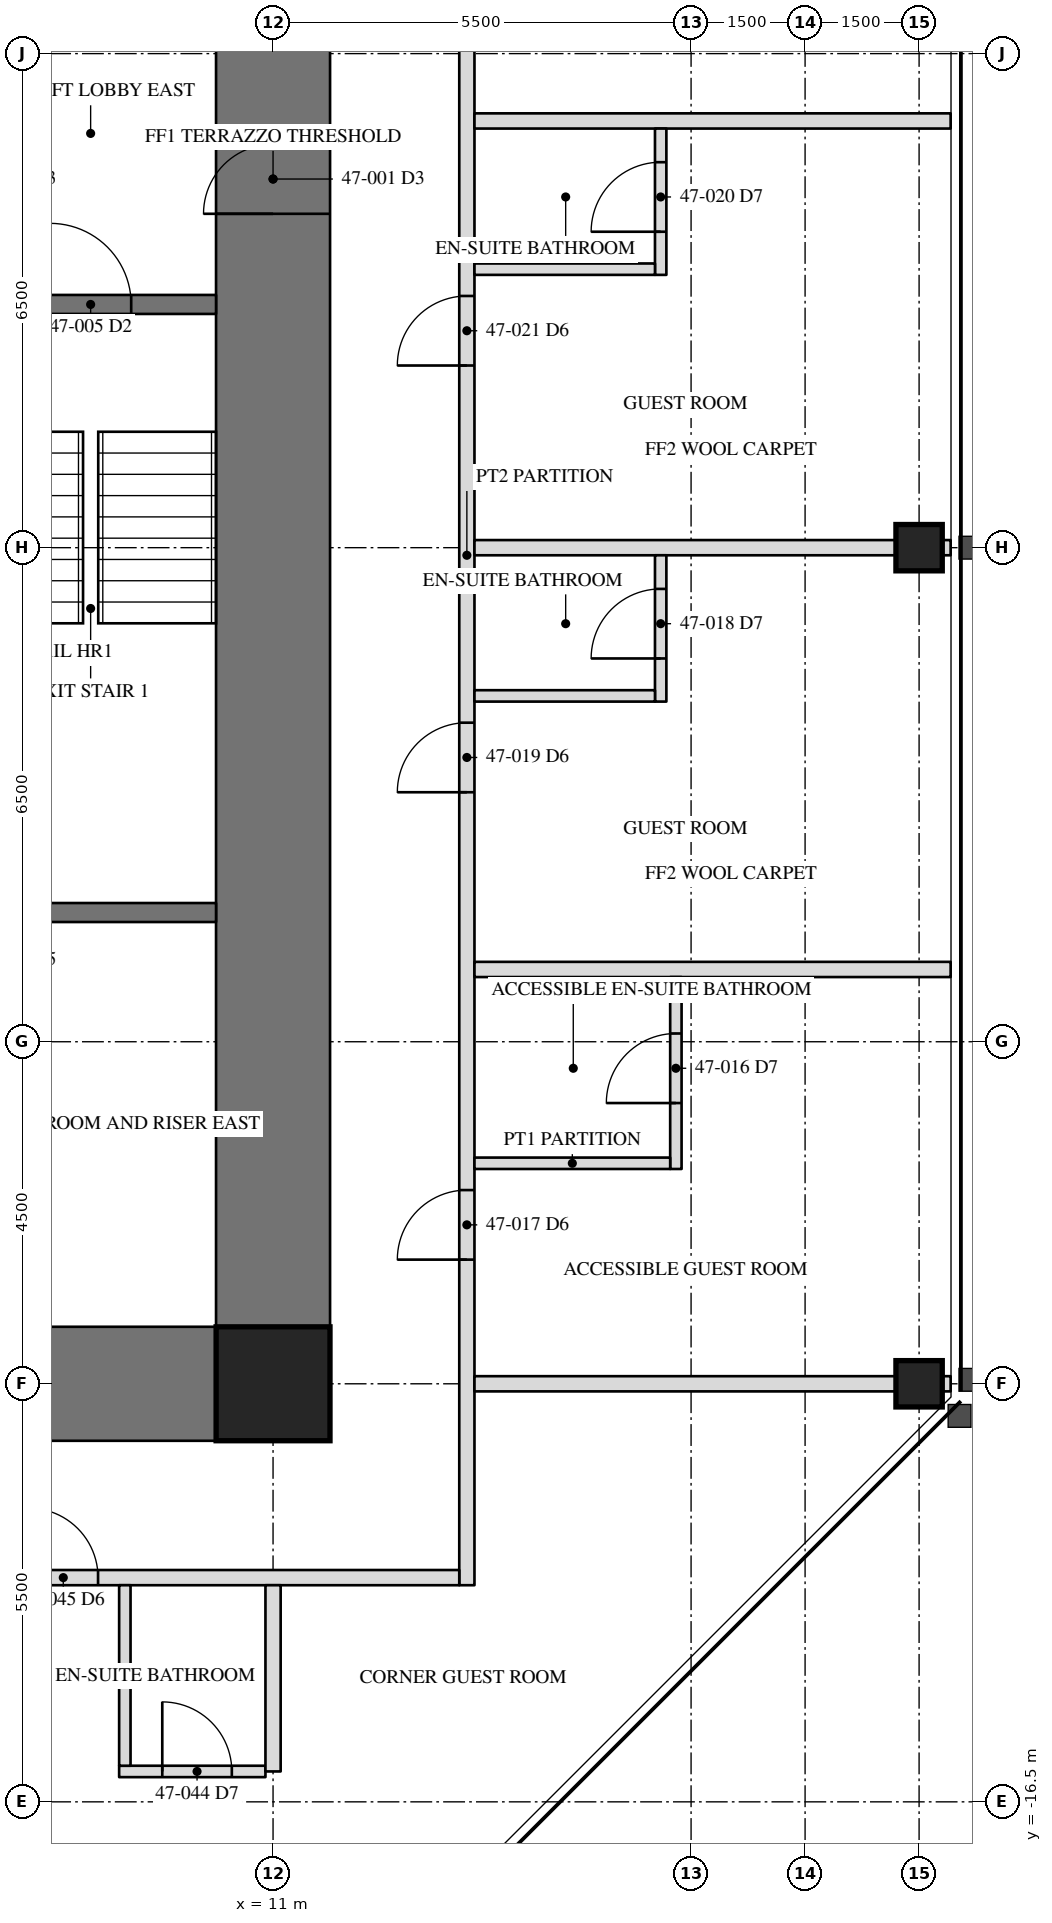
"""IFC4 building model, lengths in metres.
Left out: names, types, materials, properties, quantities, classifications, styles, units other than length and angle.
Written with IfcOpenShell. Run it as: python <this file> out.ifc"""

import sys

from ifc_helpers import new_model, si_unit, direction, frame, frame_2d, origin, origin_2d, place, context, subcontext, project, spatial, rectangle, hollow_rectangle, extrude, element, fill, save


model = new_model("IFC4")
c1 = context("Model", 3, precision=1e-05, world=origin(), true_north=direction((0.0, 1.0)))
c2 = subcontext(c1, "Body", "Model", "MODEL_VIEW")
j1 = project(units=[si_unit("LENGTHUNIT", "METRE"), si_unit("PLANEANGLEUNIT", "RADIAN")], contexts=[c1])
p1 = place(None, origin())
s1 = spatial("IfcSite", under=j1, at=p1, CompositionType="ELEMENT")
p2 = place(p1, origin())
s2 = spatial("IfcBuilding", under=s1, at=p2, CompositionType="ELEMENT")
p3 = place(p2, frame((0.0, 0.0, 201.2)))
s3 = spatial("IfcBuildingStorey", under=s2, at=p3, CompositionType="ELEMENT", Elevation=201.2)
for number, where, z_axis, x_axis in (
    (1, (19.5, -11.0, 0.0), (0.0, 0.0, 1.0), (0.0, 1.0, 0.0)),
    (2, (19.5, 0.0, 0.0), (0.0, 0.0, 1.0), (0.0, 1.0, 0.0)),
):
    element("IfcColumn", number, at=place(p3, frame(where, z_axis=z_axis, x_axis=x_axis)), inside=s3, PredefinedType="COLUMN", context=c2, shape_type="SweptSolid", body=[
        extrude(hollow_rectangle(XDim=0.61, YDim=0.61, WallThickness=0.076, at=origin_2d()), origin(), (0.0, 0.0, 1.0), 3.5),
    ])
p4 = place(p3, frame((11.0, -11.0, 0.0), z_axis=(0.0, 0.0, 1.0), x_axis=(0.0, 1.0, 0.0)))
e3 = element("IfcWall", 3, at=p4, inside=s3, PredefinedType="SHEAR", context=c2, shape_type="SweptSolid", body=[
    extrude(rectangle(XDim=22.0, YDim=1.5, at=frame_2d((11.0, 0.0))), origin(), (0.0, 0.0, 1.0), 3.5),
])
p5 = place(p4, frame((15.393, 0.0, 0.0)))
e4 = element("IfcOpeningElement", 4, at=p5, cuts=e3, PredefinedType="OPENING", context=c2, shape_type="SweptSolid", body=[
    extrude(rectangle(XDim=0.915, YDim=2.134, at=frame_2d((0.458, 1.067))), frame((0.0, 0.76, 0.0), z_axis=(0.0, -1.0, 0.0), x_axis=(1.0, 0.0, 0.0)), (0.0, 0.0, 1.0), 1.52),
])
p6 = place(p3, frame((6.5, -11.0, 0.0), z_axis=(0.0, 0.0, 1.0), x_axis=(1.0, 0.0, 0.0)))
e5 = element("IfcWall", 5, at=p6, inside=s3, PredefinedType="SHEAR", context=c2, shape_type="SweptSolid", body=[
    extrude(rectangle(XDim=4.5, YDim=1.5, at=frame_2d((2.25, 0.0))), origin(), (0.0, 0.0, 1.0), 3.5),
])
p7 = place(p3, frame((11.0, -11.0, 0.0), z_axis=(0.0, 0.0, 1.0), x_axis=(1.0, 0.0, 0.0)))
e6 = element("IfcColumn", 6, at=p7, inside=s3, PredefinedType="COLUMN", context=c2, shape_type="SweptSolid", body=[
    extrude(hollow_rectangle(XDim=1.499, YDim=1.499, WallThickness=0.102, at=origin_2d()), origin(), (0.0, 0.0, 1.0), 3.5),
])
p8 = place(p3, frame((6.95, -4.8, 0.0), z_axis=(0.0, 0.0, 1.0), x_axis=(1.0, 0.0, 0.0)))
e7 = element("IfcWall", 7, at=p8, inside=s3, PredefinedType="SOLIDWALL", context=c2, shape_type="SweptSolid", body=[
    extrude(rectangle(XDim=3.3, YDim=0.25, at=frame_2d((1.65, 0.0))), origin(), (0.0, 0.0, 1.0), 3.31),
])
p9 = place(p3, frame((6.95, 3.2, 0.0), z_axis=(0.0, 0.0, 1.0), x_axis=(1.0, 0.0, 0.0)))
e8 = element("IfcWall", 8, at=p9, inside=s3, PredefinedType="SOLIDWALL", context=c2, shape_type="SweptSolid", body=[
    extrude(rectangle(XDim=3.3, YDim=0.25, at=frame_2d((1.65, 0.0))), origin(), (0.0, 0.0, 1.0), 3.31),
])
p10 = place(p9, frame((1.116, 0.0, 0.0)))
e9 = element("IfcOpeningElement", 9, at=p10, cuts=e8, PredefinedType="OPENING", context=c2, shape_type="SweptSolid", body=[
    extrude(rectangle(XDim=1.067, YDim=2.134, at=frame_2d((0.533, 1.067))), frame((0.0, 0.135, 0.0), z_axis=(0.0, -1.0, 0.0), x_axis=(1.0, 0.0, 0.0)), (0.0, 0.0, 1.0), 0.27),
])
p11 = place(p3, frame((13.55, -13.65, 0.0), z_axis=(0.0, 0.0, 1.0), x_axis=(0.0, 1.0, 0.0)))
e10 = element("IfcWall", 10, at=p11, inside=s3, PredefinedType="PARTITIONING", context=c2, shape_type="SweptSolid", body=[
    extrude(rectangle(XDim=27.1, YDim=0.2, at=frame_2d((13.55, 0.0))), origin(), (0.0, 0.0, 1.0), 3.31),
])
p12 = place(p11, frame((4.283, 0.0, 0.0)))
e11 = element("IfcOpeningElement", 11, at=p12, cuts=e10, PredefinedType="OPENING", context=c2, shape_type="SweptSolid", body=[
    extrude(rectangle(XDim=0.915, YDim=2.134, at=frame_2d((0.458, 1.067))), frame((0.0, 0.11, 0.0), z_axis=(0.0, -1.0, 0.0), x_axis=(1.0, 0.0, 0.0)), (0.0, 0.0, 1.0), 0.22),
])
p13 = place(p11, frame((10.433, 0.0, 0.0)))
e12 = element("IfcOpeningElement", 12, at=p13, cuts=e10, PredefinedType="OPENING", context=c2, shape_type="SweptSolid", body=[
    extrude(rectangle(XDim=0.915, YDim=2.134, at=frame_2d((0.458, 1.067))), frame((0.0, 0.11, 0.0), z_axis=(0.0, -1.0, 0.0), x_axis=(1.0, 0.0, 0.0)), (0.0, 0.0, 1.0), 0.22),
])
p14 = place(p11, frame((16.046, 0.0, 0.0)))
e13 = element("IfcOpeningElement", 13, at=p14, cuts=e10, PredefinedType="OPENING", context=c2, shape_type="SweptSolid", body=[
    extrude(rectangle(XDim=0.915, YDim=2.134, at=frame_2d((0.458, 1.067))), frame((0.0, 0.11, 0.0), z_axis=(0.0, -1.0, 0.0), x_axis=(1.0, 0.0, 0.0)), (0.0, 0.0, 1.0), 0.22),
])
p15 = place(p11, frame((21.433, 0.0, 0.0)))
e14 = element("IfcOpeningElement", 14, at=p15, cuts=e10, PredefinedType="OPENING", context=c2, shape_type="SweptSolid", body=[
    extrude(rectangle(XDim=0.915, YDim=2.134, at=frame_2d((0.458, 1.067))), frame((0.0, 0.11, 0.0), z_axis=(0.0, -1.0, 0.0), x_axis=(1.0, 0.0, 0.0)), (0.0, 0.0, 1.0), 0.22),
])
p16 = place(p3, frame((-13.65, -13.55, 0.0), z_axis=(0.0, 0.0, 1.0), x_axis=(1.0, 0.0, 0.0)))
e15 = element("IfcWall", 15, at=p16, inside=s3, PredefinedType="PARTITIONING", context=c2, shape_type="SweptSolid", body=[
    extrude(rectangle(XDim=27.1, YDim=0.2, at=frame_2d((13.55, 0.0))), origin(), (0.0, 0.0, 1.0), 3.31),
])
p17 = place(p16, frame((4.884, 0.0, 0.0)))
e16 = element("IfcOpeningElement", 16, at=p17, cuts=e15, PredefinedType="OPENING", context=c2, shape_type="SweptSolid", body=[
    extrude(rectangle(XDim=0.915, YDim=2.134, at=frame_2d((0.458, 1.067))), frame((0.0, 0.11, 0.0), z_axis=(0.0, -1.0, 0.0), x_axis=(1.0, 0.0, 0.0)), (0.0, 0.0, 1.0), 0.22),
])
p18 = place(p16, frame((10.433, 0.0, 0.0)))
e17 = element("IfcOpeningElement", 17, at=p18, cuts=e15, PredefinedType="OPENING", context=c2, shape_type="SweptSolid", body=[
    extrude(rectangle(XDim=0.915, YDim=2.134, at=frame_2d((0.458, 1.067))), frame((0.0, 0.11, 0.0), z_axis=(0.0, -1.0, 0.0), x_axis=(1.0, 0.0, 0.0)), (0.0, 0.0, 1.0), 0.22),
])
p19 = place(p16, frame((16.046, 0.0, 0.0)))
e18 = element("IfcOpeningElement", 18, at=p19, cuts=e15, PredefinedType="OPENING", context=c2, shape_type="SweptSolid", body=[
    extrude(rectangle(XDim=0.915, YDim=2.134, at=frame_2d((0.458, 1.067))), frame((0.0, 0.11, 0.0), z_axis=(0.0, -1.0, 0.0), x_axis=(1.0, 0.0, 0.0)), (0.0, 0.0, 1.0), 0.22),
])
p20 = place(p16, frame((21.433, 0.0, 0.0)))
e19 = element("IfcOpeningElement", 19, at=p20, cuts=e15, PredefinedType="OPENING", context=c2, shape_type="SweptSolid", body=[
    extrude(rectangle(XDim=0.915, YDim=2.134, at=frame_2d((0.458, 1.067))), frame((0.0, 0.11, 0.0), z_axis=(0.0, -1.0, 0.0), x_axis=(1.0, 0.0, 0.0)), (0.0, 0.0, 1.0), 0.22),
])
p21 = place(p3, frame((13.65, -11.0, 0.0), z_axis=(0.0, 0.0, 1.0), x_axis=(1.0, 0.0, 0.0)))
e20 = element("IfcWall", 20, at=p21, inside=s3, PredefinedType="PARTITIONING", context=c2, shape_type="SweptSolid", body=[
    extrude(rectangle(XDim=6.265, YDim=0.2, at=frame_2d((3.133, 0.0))), origin(), (0.0, 0.0, 1.0), 2.802),
])
p22 = place(p3, frame((13.65, -5.549, 0.0), z_axis=(0.0, 0.0, 1.0), x_axis=(1.0, 0.0, 0.0)))
e21 = element("IfcWall", 21, at=p22, inside=s3, PredefinedType="PARTITIONING", context=c2, shape_type="SweptSolid", body=[
    extrude(rectangle(XDim=6.265, YDim=0.2, at=frame_2d((3.133, 0.0))), origin(), (0.0, 0.0, 1.0), 3.31),
])
p23 = place(p3, frame((13.65, 0.0, 0.0), z_axis=(0.0, 0.0, 1.0), x_axis=(1.0, 0.0, 0.0)))
e22 = element("IfcWall", 22, at=p23, inside=s3, PredefinedType="PARTITIONING", context=c2, shape_type="SweptSolid", body=[
    extrude(rectangle(XDim=6.265, YDim=0.2, at=frame_2d((3.133, 0.0))), origin(), (0.0, 0.0, 1.0), 2.802),
])
p24 = place(p3, frame((13.65, 5.614, 0.0), z_axis=(0.0, 0.0, 1.0), x_axis=(1.0, 0.0, 0.0)))
e23 = element("IfcWall", 23, at=p24, inside=s3, PredefinedType="PARTITIONING", context=c2, shape_type="SweptSolid", body=[
    extrude(rectangle(XDim=6.265, YDim=0.2, at=frame_2d((3.133, 0.0))), origin(), (0.0, 0.0, 1.0), 3.31),
])
p25 = place(p3, frame((16.3, -8.174, 0.0), z_axis=(0.0, 0.0, 1.0), x_axis=(0.0, 1.0, 0.0)))
e24 = element("IfcWall", 24, at=p25, inside=s3, PredefinedType="PARTITIONING", context=c2, shape_type="SweptSolid", body=[
    extrude(rectangle(XDim=2.525, YDim=0.15, at=frame_2d((1.263, 0.0))), origin(), (0.0, 0.0, 1.0), 3.31),
])
p26 = place(p25, frame((0.867, 0.0, 0.0)))
e25 = element("IfcOpeningElement", 25, at=p26, cuts=e24, PredefinedType="OPENING", context=c2, shape_type="SweptSolid", body=[
    extrude(rectangle(XDim=0.915, YDim=2.032, at=frame_2d((0.458, 1.016))), frame((0.0, 0.085, 0.0), z_axis=(0.0, -1.0, 0.0), x_axis=(1.0, 0.0, 0.0)), (0.0, 0.0, 1.0), 0.17),
])
p27 = place(p3, frame((13.65, -8.099, 0.0), z_axis=(0.0, 0.0, 1.0), x_axis=(1.0, 0.0, 0.0)))
e26 = element("IfcWall", 26, at=p27, inside=s3, PredefinedType="PARTITIONING", context=c2, shape_type="SweptSolid", body=[
    extrude(rectangle(XDim=2.575, YDim=0.15, at=frame_2d((1.288, 0.0))), origin(), (0.0, 0.0, 1.0), 3.31),
])
p28 = place(p3, frame((16.1, -2.025, 0.0), z_axis=(0.0, 0.0, 1.0), x_axis=(0.0, 1.0, 0.0)))
e27 = element("IfcWall", 27, at=p28, inside=s3, PredefinedType="PARTITIONING", context=c2, shape_type="SweptSolid", body=[
    extrude(rectangle(XDim=1.925, YDim=0.15, at=frame_2d((0.962, 0.0))), origin(), (0.0, 0.0, 1.0), 3.31),
])
p29 = place(p28, frame((0.567, 0.0, 0.0)))
e28 = element("IfcOpeningElement", 28, at=p29, cuts=e27, PredefinedType="OPENING", context=c2, shape_type="SweptSolid", body=[
    extrude(rectangle(XDim=0.915, YDim=2.032, at=frame_2d((0.458, 1.016))), frame((0.0, 0.085, 0.0), z_axis=(0.0, -1.0, 0.0), x_axis=(1.0, 0.0, 0.0)), (0.0, 0.0, 1.0), 0.17),
])
p30 = place(p3, frame((13.65, -1.95, 0.0), z_axis=(0.0, 0.0, 1.0), x_axis=(1.0, 0.0, 0.0)))
e29 = element("IfcWall", 29, at=p30, inside=s3, PredefinedType="PARTITIONING", context=c2, shape_type="SweptSolid", body=[
    extrude(rectangle(XDim=2.375, YDim=0.15, at=frame_2d((1.188, 0.0))), origin(), (0.0, 0.0, 1.0), 3.31),
])
p31 = place(p3, frame((16.1, 3.589, 0.0), z_axis=(0.0, 0.0, 1.0), x_axis=(0.0, 1.0, 0.0)))
e30 = element("IfcWall", 30, at=p31, inside=s3, PredefinedType="PARTITIONING", context=c2, shape_type="SweptSolid", body=[
    extrude(rectangle(XDim=1.925, YDim=0.15, at=frame_2d((0.962, 0.0))), origin(), (0.0, 0.0, 1.0), 3.31),
])
p32 = place(p31, frame((0.567, 0.0, 0.0)))
e31 = element("IfcOpeningElement", 31, at=p32, cuts=e30, PredefinedType="OPENING", context=c2, shape_type="SweptSolid", body=[
    extrude(rectangle(XDim=0.915, YDim=2.032, at=frame_2d((0.458, 1.016))), frame((0.0, 0.085, 0.0), z_axis=(0.0, -1.0, 0.0), x_axis=(1.0, 0.0, 0.0)), (0.0, 0.0, 1.0), 0.17),
])
p33 = place(p3, frame((13.65, 3.664, 0.0), z_axis=(0.0, 0.0, 1.0), x_axis=(1.0, 0.0, 0.0)))
e32 = element("IfcWall", 32, at=p33, inside=s3, PredefinedType="PARTITIONING", context=c2, shape_type="SweptSolid", body=[
    extrude(rectangle(XDim=2.375, YDim=0.15, at=frame_2d((1.188, 0.0))), origin(), (0.0, 0.0, 1.0), 2.703),
])
p34 = place(p3, frame((8.975, -16.1, 0.0), z_axis=(0.0, 0.0, 1.0), x_axis=(1.0, 0.0, 0.0)))
e33 = element("IfcWall", 33, at=p34, inside=s3, PredefinedType="PARTITIONING", context=c2, shape_type="SweptSolid", body=[
    extrude(rectangle(XDim=1.925, YDim=0.15, at=frame_2d((0.962, 0.0))), origin(), (0.0, 0.0, 1.0), 3.31),
])
p35 = place(p34, frame((0.567, 0.0, 0.0)))
e34 = element("IfcOpeningElement", 34, at=p35, cuts=e33, PredefinedType="OPENING", context=c2, shape_type="SweptSolid", body=[
    extrude(rectangle(XDim=0.915, YDim=2.032, at=frame_2d((0.458, 1.016))), frame((0.0, 0.085, 0.0), z_axis=(0.0, -1.0, 0.0), x_axis=(1.0, 0.0, 0.0)), (0.0, 0.0, 1.0), 0.17),
])
p36 = place(p3, frame((9.05, -13.65, 0.0), z_axis=(0.0, 0.0, 1.0), x_axis=(0.0, -1.0, 0.0)))
e35 = element("IfcWall", 35, at=p36, inside=s3, PredefinedType="PARTITIONING", context=c2, shape_type="SweptSolid", body=[
    extrude(rectangle(XDim=2.375, YDim=0.15, at=frame_2d((1.188, 0.0))), origin(), (0.0, 0.0, 1.0), 3.31),
])
p37 = place(p3, frame((11.0, -13.65, 0.0), z_axis=(0.0, 0.0, 1.0), x_axis=(0.0, -1.0, 0.0)))
e36 = element("IfcWall", 36, at=p37, inside=s3, PredefinedType="PARTITIONING", context=c2, shape_type="SweptSolid", body=[
    extrude(rectangle(XDim=2.45, YDim=0.2, at=frame_2d((1.225, 0.0))), origin(), (0.0, 0.0, 1.0), 2.802),
])
p38 = place(p5, origin())
e37 = element("IfcDoor", 37, at=p38, inside=s3, OperationType="SINGLE_SWING_RIGHT", PredefinedType="DOOR", context=c2, shape_type="SweptSolid", body=[
    extrude(rectangle(XDim=0.915, YDim=2.134, at=frame_2d((0.458, 1.067))), frame((0.0, -0.675, 0.0), z_axis=(0.0, -1.0, 0.0), x_axis=(1.0, 0.0, 0.0)), (0.0, 0.0, 1.0), 0.05),
])
fill(e4, e37)
p39 = place(p10, origin())
e38 = element("IfcDoor", 38, at=p39, inside=s3, OperationType="SINGLE_SWING_LEFT", PredefinedType="DOOR", context=c2, shape_type="SweptSolid", body=[
    extrude(rectangle(XDim=1.067, YDim=2.134, at=frame_2d((0.533, 1.067))), frame((0.0, 0.025, 0.0), z_axis=(0.0, -1.0, 0.0), x_axis=(1.0, 0.0, 0.0)), (0.0, 0.0, 1.0), 0.05),
])
fill(e9, e38)
p40 = place(p26, origin())
e39 = element("IfcDoor", 39, at=p40, inside=s3, OperationType="SINGLE_SWING_LEFT", PredefinedType="DOOR", context=c2, shape_type="SweptSolid", body=[
    extrude(rectangle(XDim=0.915, YDim=2.032, at=frame_2d((0.458, 1.016))), frame((0.0, 0.025, 0.0), z_axis=(0.0, -1.0, 0.0), x_axis=(1.0, 0.0, 0.0)), (0.0, 0.0, 1.0), 0.05),
])
fill(e25, e39)
p41 = place(p12, origin())
e40 = element("IfcDoor", 40, at=p41, inside=s3, OperationType="SINGLE_SWING_LEFT", PredefinedType="DOOR", context=c2, shape_type="SweptSolid", body=[
    extrude(rectangle(XDim=0.915, YDim=2.134, at=frame_2d((0.458, 1.067))), frame((0.0, 0.025, 0.0), z_axis=(0.0, -1.0, 0.0), x_axis=(1.0, 0.0, 0.0)), (0.0, 0.0, 1.0), 0.05),
])
fill(e11, e40)
p42 = place(p29, origin())
e41 = element("IfcDoor", 41, at=p42, inside=s3, OperationType="SINGLE_SWING_LEFT", PredefinedType="DOOR", context=c2, shape_type="SweptSolid", body=[
    extrude(rectangle(XDim=0.915, YDim=2.032, at=frame_2d((0.458, 1.016))), frame((0.0, 0.025, 0.0), z_axis=(0.0, -1.0, 0.0), x_axis=(1.0, 0.0, 0.0)), (0.0, 0.0, 1.0), 0.05),
])
fill(e28, e41)
p43 = place(p13, origin())
e42 = element("IfcDoor", 42, at=p43, inside=s3, OperationType="SINGLE_SWING_LEFT", PredefinedType="DOOR", context=c2, shape_type="SweptSolid", body=[
    extrude(rectangle(XDim=0.915, YDim=2.134, at=frame_2d((0.458, 1.067))), frame((0.0, 0.025, 0.0), z_axis=(0.0, -1.0, 0.0), x_axis=(1.0, 0.0, 0.0)), (0.0, 0.0, 1.0), 0.05),
])
fill(e12, e42)
p44 = place(p32, origin())
e43 = element("IfcDoor", 43, at=p44, inside=s3, OperationType="SINGLE_SWING_LEFT", PredefinedType="DOOR", context=c2, shape_type="SweptSolid", body=[
    extrude(rectangle(XDim=0.915, YDim=2.032, at=frame_2d((0.458, 1.016))), frame((0.0, 0.025, 0.0), z_axis=(0.0, -1.0, 0.0), x_axis=(1.0, 0.0, 0.0)), (0.0, 0.0, 1.0), 0.05),
])
fill(e31, e43)
p45 = place(p14, origin())
e44 = element("IfcDoor", 44, at=p45, inside=s3, OperationType="SINGLE_SWING_LEFT", PredefinedType="DOOR", context=c2, shape_type="SweptSolid", body=[
    extrude(rectangle(XDim=0.915, YDim=2.134, at=frame_2d((0.458, 1.067))), frame((0.0, 0.025, 0.0), z_axis=(0.0, -1.0, 0.0), x_axis=(1.0, 0.0, 0.0)), (0.0, 0.0, 1.0), 0.05),
])
fill(e13, e44)
p46 = place(p35, origin())
e45 = element("IfcDoor", 45, at=p46, inside=s3, OperationType="SINGLE_SWING_LEFT", PredefinedType="DOOR", context=c2, shape_type="SweptSolid", body=[
    extrude(rectangle(XDim=0.915, YDim=2.032, at=frame_2d((0.458, 1.016))), frame((0.0, 0.025, 0.0), z_axis=(0.0, -1.0, 0.0), x_axis=(1.0, 0.0, 0.0)), (0.0, 0.0, 1.0), 0.05),
])
fill(e34, e45)
p47 = place(p20, origin())
e46 = element("IfcDoor", 46, at=p47, inside=s3, OperationType="SINGLE_SWING_LEFT", PredefinedType="DOOR", context=c2, shape_type="SweptSolid", body=[
    extrude(rectangle(XDim=0.915, YDim=2.134, at=frame_2d((0.458, 1.067))), frame((0.0, 0.025, 0.0), z_axis=(0.0, -1.0, 0.0), x_axis=(1.0, 0.0, 0.0)), (0.0, 0.0, 1.0), 0.05),
])
fill(e19, e46)
save(model, sys.argv[1])
